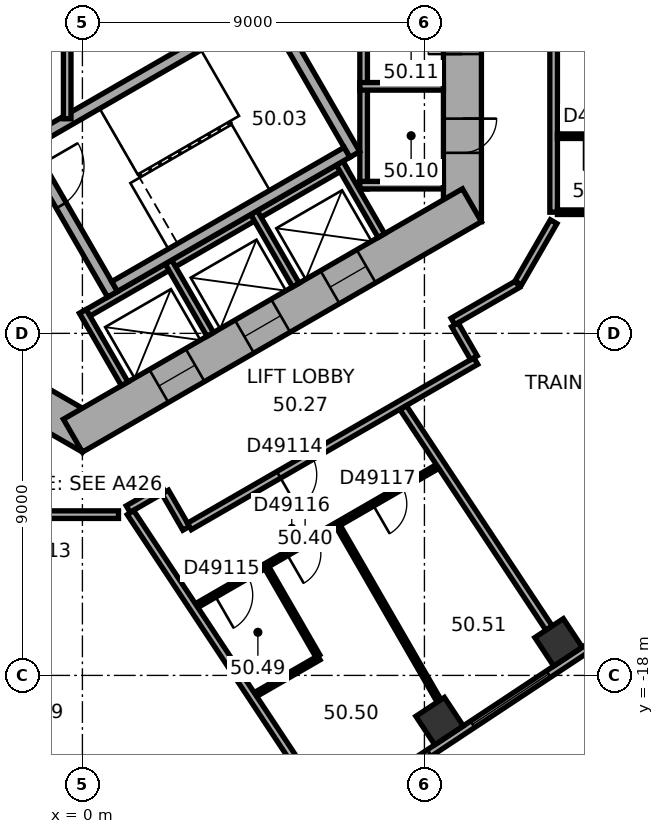
"""IFC4 building model, lengths in metres.
Left out: names, types, materials, properties, quantities, classifications, styles, units other than length and angle.
Written with IfcOpenShell. Run it as: python <this file> out.ifc"""

import sys

from ifc_helpers import new_model, si_unit, direction, frame, frame_2d, origin, origin_2d, place, context, subcontext, project, spatial, rectangle, extrude, element, fill, save


model = new_model("IFC4")
c1 = context("Model", 3, precision=1e-05, world=origin(), true_north=direction((0.0, 1.0)))
c2 = subcontext(c1, "Body", "Model", "MODEL_VIEW")
j1 = project(units=[si_unit("LENGTHUNIT", "METRE"), si_unit("PLANEANGLEUNIT", "RADIAN")], contexts=[c1])
p1 = place(None, origin())
s1 = spatial("IfcSite", under=j1, at=p1, CompositionType="ELEMENT")
p2 = place(p1, origin())
s2 = spatial("IfcBuilding", under=s1, at=p2, CompositionType="ELEMENT")
p3 = place(p2, frame((0.0, 0.0, 202.1)))
s3 = spatial("IfcBuildingStorey", under=s2, at=p3, CompositionType="ELEMENT", Elevation=202.1)
for number, where, z_axis, x_axis in (
    (1, (9.398, -19.202, 0.0), (0.0, 0.0, 1.0), (0.834, 0.552, 0.0)),
    (2, (12.529, -17.13, 0.0), (0.0, 0.0, 1.0), (0.834, 0.552, 0.0)),
):
    element("IfcColumn", number, at=place(p3, frame(where, z_axis=z_axis, x_axis=x_axis)), inside=s3, PredefinedType="COLUMN", context=c2, shape_type="SweptSolid", body=[
        extrude(rectangle(XDim=0.9, YDim=0.9, at=origin_2d()), origin(), (0.0, 0.0, 1.0), 3.7),
    ])
p4 = place(p3, frame((10.0, -6.062, 0.0), z_axis=(0.0, 0.0, 1.0), x_axis=(0.0, 1.0, 0.0)))
e3 = element("IfcWall", 3, at=p4, inside=s3, PredefinedType="SHEAR", context=c2, shape_type="SweptSolid", body=[
    extrude(rectangle(XDim=12.125, YDim=1.0, at=frame_2d((6.062, 0.0))), origin(), (0.0, 0.0, 1.0), 3.7),
])
p5 = place(p4, frame((6.262, 0.0, 0.0)))
e4 = element("IfcOpeningElement", 4, at=p5, cuts=e3, PredefinedType="OPENING", context=c2, shape_type="SweptSolid", body=[
    extrude(rectangle(XDim=1.5, YDim=2.1, at=frame_2d((0.75, 1.05))), frame((0.0, 0.51, 0.0), z_axis=(0.0, -1.0, 0.0), x_axis=(1.0, 0.0, 0.0)), (0.0, 0.0, 1.0), 1.02),
])
p6 = place(p4, frame((1.812, 0.0, 0.0)))
e5 = element("IfcOpeningElement", 5, at=p6, cuts=e3, PredefinedType="OPENING", context=c2, shape_type="SweptSolid", body=[
    extrude(rectangle(XDim=0.9, YDim=2.1, at=frame_2d((0.45, 1.05))), frame((0.0, 0.51, 0.0), z_axis=(0.0, -1.0, 0.0), x_axis=(1.0, 0.0, 0.0)), (0.0, 0.0, 1.0), 1.02),
])
p7 = place(p4, frame((4.412, 0.0, 0.0)))
e6 = element("IfcOpeningElement", 6, at=p7, cuts=e3, PredefinedType="OPENING", context=c2, shape_type="SweptSolid", body=[
    extrude(rectangle(XDim=0.9, YDim=2.1, at=frame_2d((0.45, 1.05))), frame((0.0, 0.51, 0.0), z_axis=(0.0, -1.0, 0.0), x_axis=(1.0, 0.0, 0.0)), (0.0, 0.0, 1.0), 1.02),
])
p8 = place(p3, frame((-10.25, -5.629, 0.0), z_axis=(0.0, 0.0, 1.0), x_axis=(0.866022616891, -0.50000482701, 0.0)))
e7 = element("IfcWall", 7, at=p8, inside=s3, PredefinedType="SHEAR", context=c2, shape_type="SweptSolid", body=[
    extrude(rectangle(XDim=12.125, YDim=1.0, at=frame_2d((6.062, 0.0))), origin(), (0.0, 0.0, 1.0), 3.7),
])
p9 = place(p8, frame((6.262, 0.0, 0.0)))
e8 = element("IfcOpeningElement", 8, at=p9, cuts=e7, PredefinedType="OPENING", context=c2, shape_type="SweptSolid", body=[
    extrude(rectangle(XDim=1.5, YDim=2.1, at=frame_2d((0.75, 1.05))), frame((0.0, 0.51, 0.0), z_axis=(0.0, -1.0, 0.0), x_axis=(1.0, 0.0, 0.0)), (0.0, 0.0, 1.0), 1.02),
])
p10 = place(p8, frame((1.712, 0.0, 0.0)))
e9 = element("IfcOpeningElement", 9, at=p10, cuts=e7, PredefinedType="OPENING", context=c2, shape_type="SweptSolid", body=[
    extrude(rectangle(XDim=1.1, YDim=2.1, at=frame_2d((0.55, 1.05))), frame((0.0, 0.51, 0.0), z_axis=(0.0, -1.0, 0.0), x_axis=(1.0, 0.0, 0.0)), (0.0, 0.0, 1.0), 1.02),
])
p11 = place(p8, frame((4.312, 0.0, 0.0)))
e10 = element("IfcOpeningElement", 10, at=p11, cuts=e7, PredefinedType="OPENING", context=c2, shape_type="SweptSolid", body=[
    extrude(rectangle(XDim=1.1, YDim=2.1, at=frame_2d((0.55, 1.05))), frame((0.0, 0.51, 0.0), z_axis=(0.0, -1.0, 0.0), x_axis=(1.0, 0.0, 0.0)), (0.0, 0.0, 1.0), 1.02),
])
p12 = place(p3, frame((-0.25, -11.691, 0.0), z_axis=(0.0, 0.0, 1.0), x_axis=(0.866022616891, 0.50000482701, 0.0)))
e11 = element("IfcWall", 11, at=p12, inside=s3, PredefinedType="SHEAR", context=c2, shape_type="SweptSolid", body=[
    extrude(rectangle(XDim=12.125, YDim=1.0, at=frame_2d((6.062, 0.0))), origin(), (0.0, 0.0, 1.0), 3.7),
])
p13 = place(p12, frame((2.612, 0.0, 0.0)))
e12 = element("IfcOpeningElement", 12, at=p13, cuts=e11, PredefinedType="OPENING", context=c2, shape_type="SweptSolid", body=[
    extrude(rectangle(XDim=1.1, YDim=2.1, at=frame_2d((0.55, 1.05))), frame((0.0, 0.51, 0.0), z_axis=(0.0, -1.0, 0.0), x_axis=(1.0, 0.0, 0.0)), (0.0, 0.0, 1.0), 1.02),
])
p14 = place(p12, frame((5.212, 0.0, 0.0)))
e13 = element("IfcOpeningElement", 13, at=p14, cuts=e11, PredefinedType="OPENING", context=c2, shape_type="SweptSolid", body=[
    extrude(rectangle(XDim=1.1, YDim=2.1, at=frame_2d((0.55, 1.05))), frame((0.0, 0.51, 0.0), z_axis=(0.0, -1.0, 0.0), x_axis=(1.0, 0.0, 0.0)), (0.0, 0.0, 1.0), 1.02),
])
p15 = place(p12, frame((7.812, 0.0, 0.0)))
e14 = element("IfcOpeningElement", 14, at=p15, cuts=e11, PredefinedType="OPENING", context=c2, shape_type="SweptSolid", body=[
    extrude(rectangle(XDim=1.1, YDim=2.1, at=frame_2d((0.55, 1.05))), frame((0.0, 0.51, 0.0), z_axis=(0.0, -1.0, 0.0), x_axis=(1.0, 0.0, 0.0)), (0.0, 0.0, 1.0), 1.02),
])
p16 = place(p3, frame((2.911, -24.156, 0.0), z_axis=(0.0, 0.0, 1.0), x_axis=(0.833882163564, 0.551942512668, 0.0)))
e15 = element("IfcWall", 15, at=p16, inside=s3, PredefinedType="STANDARD", context=c2, shape_type="SweptSolid", body=[
    extrude(rectangle(XDim=20.044, YDim=0.2, at=frame_2d((10.022, 0.0))), origin(), (0.0, 0.0, 1.0), 3.7),
])
p17 = place(p16, frame((1.313, 0.0, 0.9)))
e16 = element("IfcOpeningElement", 16, at=p17, cuts=e15, PredefinedType="OPENING", context=c2, shape_type="SweptSolid", body=[
    extrude(rectangle(XDim=2.4, YDim=2.0, at=frame_2d((1.2, 1.0))), frame((0.0, 0.11, 0.0), z_axis=(0.0, -1.0, 0.0), x_axis=(1.0, 0.0, 0.0)), (0.0, 0.0, 1.0), 0.22),
])
p18 = place(p16, frame((5.067, 0.0, 0.9)))
e17 = element("IfcOpeningElement", 17, at=p18, cuts=e15, PredefinedType="OPENING", context=c2, shape_type="SweptSolid", body=[
    extrude(rectangle(XDim=2.4, YDim=2.0, at=frame_2d((1.2, 1.0))), frame((0.0, 0.11, 0.0), z_axis=(0.0, -1.0, 0.0), x_axis=(1.0, 0.0, 0.0)), (0.0, 0.0, 1.0), 0.22),
])
p19 = place(p16, frame((8.821, 0.0, 0.9)))
e18 = element("IfcOpeningElement", 18, at=p19, cuts=e15, PredefinedType="OPENING", context=c2, shape_type="SweptSolid", body=[
    extrude(rectangle(XDim=2.4, YDim=2.0, at=frame_2d((1.2, 1.0))), frame((0.0, 0.11, 0.0), z_axis=(0.0, -1.0, 0.0), x_axis=(1.0, 0.0, 0.0)), (0.0, 0.0, 1.0), 0.22),
])
p20 = place(p16, frame((12.575, 0.0, 0.9)))
e19 = element("IfcOpeningElement", 19, at=p20, cuts=e15, PredefinedType="OPENING", context=c2, shape_type="SweptSolid", body=[
    extrude(rectangle(XDim=2.4, YDim=2.0, at=frame_2d((1.2, 1.0))), frame((0.0, 0.11, 0.0), z_axis=(0.0, -1.0, 0.0), x_axis=(1.0, 0.0, 0.0)), (0.0, 0.0, 1.0), 0.22),
])
p21 = place(p16, frame((16.329, 0.0, 0.9)))
e20 = element("IfcOpeningElement", 20, at=p21, cuts=e15, PredefinedType="OPENING", context=c2, shape_type="SweptSolid", body=[
    extrude(rectangle(XDim=2.4, YDim=2.0, at=frame_2d((1.2, 1.0))), frame((0.0, 0.11, 0.0), z_axis=(0.0, -1.0, 0.0), x_axis=(1.0, 0.0, 0.0)), (0.0, 0.0, 1.0), 0.22),
])
p22 = place(p3, frame((7.4, -5.2, 0.0), z_axis=(0.0, 0.0, 1.0), x_axis=(0.0, 1.0, 0.0)))
e21 = element("IfcWall", 21, at=p22, inside=s3, PredefinedType="PARTITIONING", context=c2, shape_type="SweptSolid", body=[
    extrude(rectangle(XDim=5.4, YDim=0.2, at=frame_2d((2.7, 0.0))), origin(), (0.0, 0.0, 1.0), 3.35),
])
for number, where, z_axis, x_axis in (
    (22, (7.3, -5.1, 0.0), (0.0, 0.0, 1.0), (1.0, 0.0, 0.0)),
    (23, (7.3, -2.5, 0.0), (0.0, 0.0, 1.0), (1.0, 0.0, 0.0)),
):
    element("IfcWall", number, at=place(p3, frame(where, z_axis=z_axis, x_axis=x_axis)), inside=s3, PredefinedType="PARTITIONING", context=c2, shape_type="SweptSolid", body=[
        extrude(rectangle(XDim=2.2, YDim=0.2, at=frame_2d((1.1, 0.0))), origin(), (0.0, 0.0, 1.0), 3.35),
    ])
p23 = place(p3, frame((-0.024, -8.559, 0.0), z_axis=(0.0, 0.0, 1.0), x_axis=(0.866026010844, 0.49999894854, 0.0)))
e24 = element("IfcWall", 24, at=p23, inside=s3, PredefinedType="PARTITIONING", context=c2, shape_type="SweptSolid", body=[
    extrude(rectangle(XDim=8.0, YDim=0.2, at=frame_2d((4.0, 0.0))), origin(), (0.0, 0.0, 1.0), 3.35),
])
for number, where, z_axis, x_axis in (
    (25, (0.013, -8.422, 0.0), (0.0, 0.0, 1.0), (0.5, -0.866, 0.0)),
    (26, (2.264, -7.122, 0.0), (0.0, 0.0, 1.0), (0.5, -0.866, 0.0)),
    (27, (4.516, -5.822, 0.0), (0.0, 0.0, 1.0), (0.5, -0.866, 0.0)),
    (28, (6.768, -4.522, 0.0), (0.0, 0.0, 1.0), (0.5, -0.866, 0.0)),
):
    element("IfcWall", number, at=place(p3, frame(where, z_axis=z_axis, x_axis=x_axis)), inside=s3, PredefinedType="PARTITIONING", context=c2, shape_type="SweptSolid", body=[
        extrude(rectangle(XDim=2.2, YDim=0.2, at=frame_2d((1.1, 0.0))), origin(), (0.0, 0.0, 1.0), 3.35),
    ])
p24 = place(p3, frame((-1.558, -3.902, 0.0), z_axis=(0.0, 0.0, 1.0), x_axis=(0.499977259774, -0.866038532462, 0.0)))
e29 = element("IfcWall", 29, at=p24, inside=s3, PredefinedType="SHEAR", context=c2, shape_type="SweptSolid", body=[
    extrude(rectangle(XDim=4.7, YDim=0.3, at=frame_2d((2.35, 0.0))), origin(), (0.0, 0.0, 1.0), 3.35),
])
p25 = place(p24, frame((0.8, 0.0, 0.0)))
e30 = element("IfcOpeningElement", 30, at=p25, cuts=e29, PredefinedType="OPENING", context=c2, shape_type="SweptSolid", body=[
    extrude(rectangle(XDim=1.2, YDim=2.1, at=frame_2d((0.6, 1.05))), frame((0.0, 0.16, 0.0), z_axis=(0.0, -1.0, 0.0), x_axis=(1.0, 0.0, 0.0)), (0.0, 0.0, 1.0), 0.32),
])
p26 = place(p3, frame((4.816, -0.222, 0.0), z_axis=(0.0, 0.0, 1.0), x_axis=(0.499977259774, -0.866038532462, 0.0)))
e31 = element("IfcWall", 31, at=p26, inside=s3, PredefinedType="SHEAR", context=c2, shape_type="SweptSolid", body=[
    extrude(rectangle(XDim=4.7, YDim=0.3, at=frame_2d((2.35, 0.0))), origin(), (0.0, 0.0, 1.0), 3.35),
])
for number, where, z_axis, x_axis in (
    (32, (-1.353, -3.957, 0.0), (0.0, 0.0, 1.0), (0.866, 0.5, 0.0)),
    (33, (0.847, -7.767, 0.0), (0.0, 0.0, 1.0), (0.866, 0.5, 0.0)),
):
    element("IfcWall", number, at=place(p3, frame(where, z_axis=z_axis, x_axis=x_axis)), inside=s3, PredefinedType="SHEAR", context=c2, shape_type="SweptSolid", body=[
        extrude(rectangle(XDim=7.06, YDim=0.3, at=frame_2d((3.53, 0.0))), origin(), (0.0, 0.0, 1.0), 3.35),
    ])
p27 = place(p3, frame((-0.4, -3.353, 0.0), z_axis=(0.0, 0.0, 1.0), x_axis=(0.0, 1.0, 0.0)))
e34 = element("IfcWall", 34, at=p27, inside=s3, PredefinedType="PARTITIONING", context=c2, shape_type="SweptSolid", body=[
    extrude(rectangle(XDim=6.707, YDim=0.2, at=frame_2d((3.353, 0.0))), origin(), (0.0, 0.0, 1.0), 3.35),
])
p28 = place(p3, frame((-0.91, -13.77, 0.0), z_axis=(0.0, 0.0, 1.0), x_axis=(1.0, 0.0, 0.0)))
e35 = element("IfcWall", 35, at=p28, inside=s3, PredefinedType="PARTITIONING", context=c2, shape_type="SweptSolid", body=[
    extrude(rectangle(XDim=1.86, YDim=0.2, at=frame_2d((0.93, 0.0))), origin(), (0.0, 0.0, 1.0), 3.35),
])
p29 = place(p3, frame((1.204, -13.623, 0.0), z_axis=(0.0, 0.0, 1.0), x_axis=(0.866040989419, 0.499973003918, 0.0)))
e36 = element("IfcWall", 36, at=p29, inside=s3, PredefinedType="PARTITIONING", context=c2, shape_type="SweptSolid", body=[
    extrude(rectangle(XDim=1.068, YDim=0.2, at=frame_2d((0.534, 0.0))), origin(), (0.0, 0.0, 1.0), 3.35),
])
p30 = place(p3, frame((2.179, -13.176, 0.0), z_axis=(0.0, 0.0, 1.0), x_axis=(0.499978356969, -0.866037899034, 0.0)))
e37 = element("IfcWall", 37, at=p30, inside=s3, PredefinedType="PARTITIONING", context=c2, shape_type="SweptSolid", body=[
    extrude(rectangle(XDim=1.101, YDim=0.2, at=frame_2d((0.551, 0.0))), origin(), (0.0, 0.0, 1.0), 3.35),
])
p31 = place(p3, frame((2.816, -14.079, 0.0), z_axis=(0.0, 0.0, 1.0), x_axis=(0.866021128829, 0.500007404367, 0.0)))
e38 = element("IfcWall", 38, at=p31, inside=s3, PredefinedType="PARTITIONING", context=c2, shape_type="SweptSolid", body=[
    extrude(rectangle(XDim=8.702, YDim=0.2, at=frame_2d((4.351, 0.0))), origin(), (0.0, 0.0, 1.0), 3.35),
])
p32 = place(p31, frame((2.714, 0.0, 0.0)))
e39 = element("IfcOpeningElement", 39, at=p32, cuts=e38, PredefinedType="OPENING", context=c2, shape_type="SweptSolid", body=[
    extrude(rectangle(XDim=1.0, YDim=2.1, at=frame_2d((0.5, 1.05))), frame((0.0, 0.11, 0.0), z_axis=(0.0, -1.0, 0.0), x_axis=(1.0, 0.0, 0.0)), (0.0, 0.0, 1.0), 0.22),
])
p33 = place(p3, frame((3.005, -16.164, 0.0), z_axis=(0.0, 0.0, 1.0), x_axis=(0.866018452427, 0.500012039911, 0.0)))
e40 = element("IfcWall", 40, at=p33, inside=s3, PredefinedType="PARTITIONING", context=c2, shape_type="SweptSolid", body=[
    extrude(rectangle(XDim=7.322, YDim=0.12, at=frame_2d((3.661, 0.0))), origin(), (0.0, 0.0, 1.0), 3.35),
])
p34 = place(p33, frame((0.55, 0.0, 0.0)))
e41 = element("IfcOpeningElement", 41, at=p34, cuts=e40, PredefinedType="OPENING", context=c2, shape_type="SweptSolid", body=[
    extrude(rectangle(XDim=1.0, YDim=2.1, at=frame_2d((0.5, 1.05))), frame((0.0, 0.07, 0.0), z_axis=(0.0, -1.0, 0.0), x_axis=(1.0, 0.0, 0.0)), (0.0, 0.0, 1.0), 0.14),
])
p35 = place(p33, frame((2.736, 0.0, 0.0)))
e42 = element("IfcOpeningElement", 42, at=p35, cuts=e40, PredefinedType="OPENING", context=c2, shape_type="SweptSolid", body=[
    extrude(rectangle(XDim=0.9, YDim=2.1, at=frame_2d((0.45, 1.05))), frame((0.0, 0.07, 0.0), z_axis=(0.0, -1.0, 0.0), x_axis=(1.0, 0.0, 0.0)), (0.0, 0.0, 1.0), 0.14),
])
p36 = place(p33, frame((5.347, 0.0, 0.0)))
e43 = element("IfcOpeningElement", 43, at=p36, cuts=e40, PredefinedType="OPENING", context=c2, shape_type="SweptSolid", body=[
    extrude(rectangle(XDim=0.9, YDim=2.1, at=frame_2d((0.45, 1.05))), frame((0.0, 0.07, 0.0), z_axis=(0.0, -1.0, 0.0), x_axis=(1.0, 0.0, 0.0)), (0.0, 0.0, 1.0), 0.14),
])
p37 = place(p3, frame((4.553, -18.503, 0.0), z_axis=(0.0, 0.0, 1.0), x_axis=(0.865951573249, 0.50012785644, 0.0)))
e44 = element("IfcWall", 44, at=p37, inside=s3, PredefinedType="PARTITIONING", context=c2, shape_type="SweptSolid", body=[
    extrude(rectangle(XDim=1.929, YDim=0.12, at=frame_2d((0.964, 0.0))), origin(), (0.0, 0.0, 1.0), 3.35),
])
p38 = place(p3, frame((6.02, -20.899, 0.0), z_axis=(0.0, 0.0, 1.0), x_axis=(-0.551943990108, 0.833881185651, 0.0)))
e45 = element("IfcWall", 45, at=p38, inside=s3, PredefinedType="PARTITIONING", context=c2, shape_type="SweptSolid", body=[
    extrude(rectangle(XDim=8.615, YDim=0.2, at=frame_2d((4.308, 0.0))), origin(), (0.0, 0.0, 1.0), 3.35),
])
p39 = place(p3, frame((6.194, -17.487, 0.0), z_axis=(0.0, 0.0, 1.0), x_axis=(-0.499980071345, 0.866036909293, 0.0)))
e46 = element("IfcWall", 46, at=p39, inside=s3, PredefinedType="PARTITIONING", context=c2, shape_type="SweptSolid", body=[
    extrude(rectangle(XDim=2.68, YDim=0.12, at=frame_2d((1.34, 0.0))), origin(), (0.0, 0.0, 1.0), 3.35),
])
p40 = place(p3, frame((9.385, -18.672, 0.0), z_axis=(0.0, 0.0, 1.0), x_axis=(-0.500012117035, 0.866018407898, 0.0)))
e47 = element("IfcWall", 47, at=p40, inside=s3, PredefinedType="PARTITIONING", context=c2, shape_type="SweptSolid", body=[
    extrude(rectangle(XDim=5.302, YDim=0.12, at=frame_2d((2.651, 0.0))), origin(), (0.0, 0.0, 1.0), 2.55),
])
p41 = place(p3, frame((9.752, -8.688, 0.0), z_axis=(0.0, 0.0, 1.0), x_axis=(0.865974105138, 0.500088841337, 0.0)))
e48 = element("IfcWall", 48, at=p41, inside=s3, PredefinedType="PARTITIONING", context=c2, shape_type="SweptSolid", body=[
    extrude(rectangle(XDim=1.961, YDim=0.2, at=frame_2d((0.98, 0.0))), origin(), (0.0, 0.0, 1.0), 3.35),
])
p42 = place(p3, frame((10.302, -9.642, 0.0), z_axis=(0.0, 0.0, 1.0), x_axis=(-0.500074377092, 0.865982457891, 0.0)))
e49 = element("IfcWall", 49, at=p42, inside=s3, PredefinedType="PARTITIONING", context=c2, shape_type="SweptSolid", body=[
    extrude(rectangle(XDim=1.001, YDim=0.2, at=frame_2d((0.5, 0.0))), origin(), (0.0, 0.0, 1.0), 3.35),
])
p43 = place(p3, frame((11.47, -7.673, 0.0), z_axis=(0.0, 0.0, 1.0), x_axis=(0.499964847546, 0.866045698112, 0.0)))
e50 = element("IfcWall", 50, at=p43, inside=s3, PredefinedType="PARTITIONING", context=c2, shape_type="SweptSolid", body=[
    extrude(rectangle(XDim=1.86, YDim=0.2, at=frame_2d((0.93, 0.0))), origin(), (0.0, 0.0, 1.0), 3.35),
])
p44 = place(p3, frame((12.281, -16.755, 0.0), z_axis=(0.0, 0.0, 1.0), x_axis=(-0.551925794663, 0.833893228888, 0.0)))
e51 = element("IfcWall", 51, at=p44, inside=s3, PredefinedType="PARTITIONING", context=c2, shape_type="SweptSolid", body=[
    extrude(rectangle(XDim=6.953, YDim=0.2, at=frame_2d((3.476, 0.0))), origin(), (0.0, 0.0, 1.0), 3.35),
])
p45 = place(p3, frame((12.4, -5.812, 0.0), z_axis=(0.0, 0.0, 1.0), x_axis=(0.0, 1.0, 0.0)))
e52 = element("IfcWall", 52, at=p45, inside=s3, PredefinedType="PARTITIONING", context=c2, shape_type="SweptSolid", body=[
    extrude(rectangle(XDim=4.819, YDim=0.2, at=frame_2d((2.41, 0.0))), origin(), (0.0, 0.0, 1.0), 3.35),
])
p46 = place(p3, frame((12.5, -3.812, 0.0), z_axis=(0.0, 0.0, 1.0), x_axis=(1.0, 0.0, 0.0)))
e53 = element("IfcWall", 53, at=p46, inside=s3, PredefinedType="PARTITIONING", context=c2, shape_type="SweptSolid", body=[
    extrude(rectangle(XDim=2.3, YDim=0.12, at=frame_2d((1.15, 0.0))), origin(), (0.0, 0.0, 1.0), 3.35),
])
p47 = place(p46, frame((0.7, 0.0, 0.0)))
e54 = element("IfcOpeningElement", 54, at=p47, cuts=e53, PredefinedType="OPENING", context=c2, shape_type="SweptSolid", body=[
    extrude(rectangle(XDim=0.9, YDim=2.1, at=frame_2d((0.45, 1.05))), frame((0.0, 0.07, 0.0), z_axis=(0.0, -1.0, 0.0), x_axis=(1.0, 0.0, 0.0)), (0.0, 0.0, 1.0), 0.14),
])
p48 = place(p3, frame((14.8, -5.812, 0.0), z_axis=(0.0, 0.0, 1.0), x_axis=(-1.0, 0.0, 0.0)))
e55 = element("IfcWall", 55, at=p48, inside=s3, PredefinedType="PARTITIONING", context=c2, shape_type="SweptSolid", body=[
    extrude(rectangle(XDim=2.3, YDim=0.12, at=frame_2d((1.15, 0.0))), origin(), (0.0, 0.0, 1.0), 3.35),
])
p49 = place(p18, origin())
e56 = element("IfcWindow", 56, at=p49, inside=s3, PartitioningType="SINGLE_PANEL", PredefinedType="WINDOW", context=c2, shape_type="SweptSolid", body=[
    extrude(rectangle(XDim=2.4, YDim=2.0, at=frame_2d((1.2, 1.0))), frame((0.0, 0.03, 0.0), z_axis=(0.0, -1.0, 0.0), x_axis=(1.0, 0.0, 0.0)), (0.0, 0.0, 1.0), 0.06),
])
fill(e17, e56)
p50 = place(p19, origin())
e57 = element("IfcWindow", 57, at=p50, inside=s3, PartitioningType="SINGLE_PANEL", PredefinedType="WINDOW", context=c2, shape_type="SweptSolid", body=[
    extrude(rectangle(XDim=2.4, YDim=2.0, at=frame_2d((1.2, 1.0))), frame((0.0, 0.03, 0.0), z_axis=(0.0, -1.0, 0.0), x_axis=(1.0, 0.0, 0.0)), (0.0, 0.0, 1.0), 0.06),
])
fill(e18, e57)
p51 = place(p25, origin())
e58 = element("IfcDoor", 58, at=p51, inside=s3, OperationType="SINGLE_SWING_RIGHT", PredefinedType="DOOR", context=c2, shape_type="SweptSolid", body=[
    extrude(rectangle(XDim=1.2, YDim=2.1, at=frame_2d((0.6, 1.05))), frame((0.0, 0.025, 0.0), z_axis=(0.0, -1.0, 0.0), x_axis=(1.0, 0.0, 0.0)), (0.0, 0.0, 1.0), 0.05),
])
fill(e30, e58)
p52 = place(p6, origin())
e59 = element("IfcDoor", 59, at=p52, inside=s3, OperationType="SINGLE_SWING_LEFT", PredefinedType="DOOR", context=c2, shape_type="SweptSolid", body=[
    extrude(rectangle(XDim=0.9, YDim=2.1, at=frame_2d((0.45, 1.05))), frame((0.0, 0.025, 0.0), z_axis=(0.0, -1.0, 0.0), x_axis=(1.0, 0.0, 0.0)), (0.0, 0.0, 1.0), 0.05),
])
fill(e5, e59)
p53 = place(p7, origin())
e60 = element("IfcDoor", 60, at=p53, inside=s3, OperationType="SINGLE_SWING_LEFT", PredefinedType="DOOR", context=c2, shape_type="SweptSolid", body=[
    extrude(rectangle(XDim=0.9, YDim=2.1, at=frame_2d((0.45, 1.05))), frame((0.0, 0.025, 0.0), z_axis=(0.0, -1.0, 0.0), x_axis=(1.0, 0.0, 0.0)), (0.0, 0.0, 1.0), 0.05),
])
fill(e6, e60)
p54 = place(p13, origin())
e61 = element("IfcDoor", 61, at=p54, inside=s3, OperationType="DOUBLE_DOOR_SLIDING", PredefinedType="DOOR", context=c2, shape_type="SweptSolid", body=[
    extrude(rectangle(XDim=1.1, YDim=2.1, at=frame_2d((0.55, 1.05))), frame((0.0, 0.025, 0.0), z_axis=(0.0, -1.0, 0.0), x_axis=(1.0, 0.0, 0.0)), (0.0, 0.0, 1.0), 0.05),
])
fill(e12, e61)
p55 = place(p14, origin())
e62 = element("IfcDoor", 62, at=p55, inside=s3, OperationType="DOUBLE_DOOR_SLIDING", PredefinedType="DOOR", context=c2, shape_type="SweptSolid", body=[
    extrude(rectangle(XDim=1.1, YDim=2.1, at=frame_2d((0.55, 1.05))), frame((0.0, 0.025, 0.0), z_axis=(0.0, -1.0, 0.0), x_axis=(1.0, 0.0, 0.0)), (0.0, 0.0, 1.0), 0.05),
])
fill(e13, e62)
p56 = place(p15, origin())
e63 = element("IfcDoor", 63, at=p56, inside=s3, OperationType="DOUBLE_DOOR_SLIDING", PredefinedType="DOOR", context=c2, shape_type="SweptSolid", body=[
    extrude(rectangle(XDim=1.1, YDim=2.1, at=frame_2d((0.55, 1.05))), frame((0.0, 0.025, 0.0), z_axis=(0.0, -1.0, 0.0), x_axis=(1.0, 0.0, 0.0)), (0.0, 0.0, 1.0), 0.05),
])
fill(e14, e63)
p57 = place(p32, origin())
e64 = element("IfcDoor", 64, at=p57, inside=s3, OperationType="SINGLE_SWING_LEFT", PredefinedType="DOOR", context=c2, shape_type="SweptSolid", body=[
    extrude(rectangle(XDim=1.0, YDim=2.1, at=frame_2d((0.5, 1.05))), frame((0.0, 0.025, 0.0), z_axis=(0.0, -1.0, 0.0), x_axis=(1.0, 0.0, 0.0)), (0.0, 0.0, 1.0), 0.05),
])
fill(e39, e64)
p58 = place(p34, origin())
e65 = element("IfcDoor", 65, at=p58, inside=s3, OperationType="SINGLE_SWING_LEFT", PredefinedType="DOOR", context=c2, shape_type="SweptSolid", body=[
    extrude(rectangle(XDim=1.0, YDim=2.1, at=frame_2d((0.5, 1.05))), frame((0.0, 0.025, 0.0), z_axis=(0.0, -1.0, 0.0), x_axis=(1.0, 0.0, 0.0)), (0.0, 0.0, 1.0), 0.05),
])
fill(e41, e65)
p59 = place(p35, origin())
e66 = element("IfcDoor", 66, at=p59, inside=s3, OperationType="SINGLE_SWING_LEFT", PredefinedType="DOOR", context=c2, shape_type="SweptSolid", body=[
    extrude(rectangle(XDim=0.9, YDim=2.1, at=frame_2d((0.45, 1.05))), frame((0.0, 0.025, 0.0), z_axis=(0.0, -1.0, 0.0), x_axis=(1.0, 0.0, 0.0)), (0.0, 0.0, 1.0), 0.05),
])
fill(e42, e66)
p60 = place(p36, origin())
e67 = element("IfcDoor", 67, at=p60, inside=s3, OperationType="SINGLE_SWING_LEFT", PredefinedType="DOOR", context=c2, shape_type="SweptSolid", body=[
    extrude(rectangle(XDim=0.9, YDim=2.1, at=frame_2d((0.45, 1.05))), frame((0.0, 0.025, 0.0), z_axis=(0.0, -1.0, 0.0), x_axis=(1.0, 0.0, 0.0)), (0.0, 0.0, 1.0), 0.05),
])
fill(e43, e67)
save(model, sys.argv[1])
